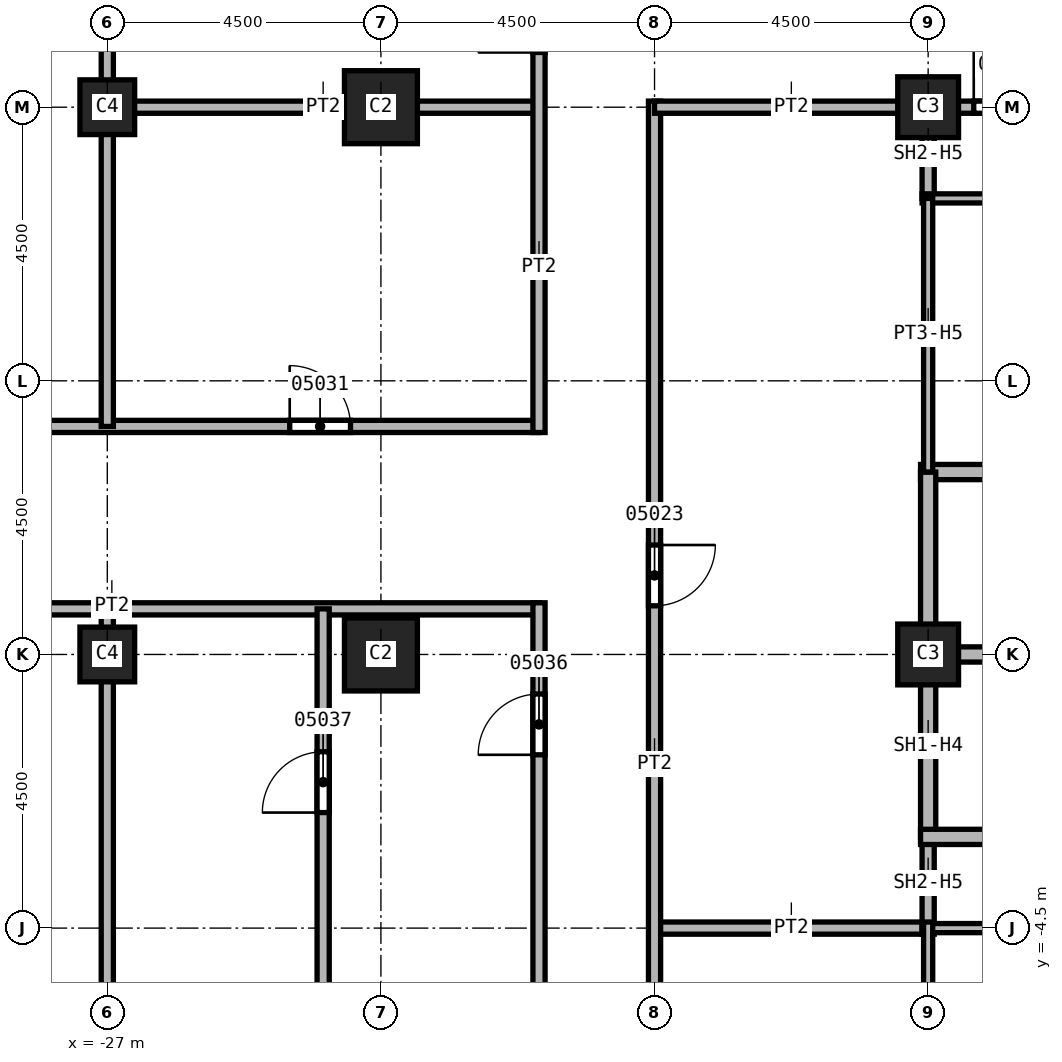
"""IFC4 building model, lengths in metres.
Left out: names, types, materials, properties, quantities, classifications, styles, units other than length and angle.
Written with IfcOpenShell. Run it as: python <this file> out.ifc"""

import sys

from ifc_helpers import new_model, si_unit, direction, frame, frame_2d, origin, origin_2d, place, context, subcontext, project, spatial, rectangle, extrude, element, fill, save


model = new_model("IFC4")
c1 = context("Model", 3, precision=1e-05, world=origin(), true_north=direction((0.0, 1.0)))
c2 = subcontext(c1, "Body", "Model", "MODEL_VIEW")
j1 = project(units=[si_unit("LENGTHUNIT", "METRE"), si_unit("PLANEANGLEUNIT", "RADIAN")], contexts=[c1])
p1 = place(None, origin())
s1 = spatial("IfcSite", under=j1, at=p1, CompositionType="ELEMENT")
p2 = place(p1, origin())
s2 = spatial("IfcBuilding", under=s1, at=p2, CompositionType="ELEMENT")
p3 = place(p2, frame((0.0, 0.0, 116.0)))
s3 = spatial("IfcBuildingStorey", under=s2, at=p3, CompositionType="ELEMENT", Elevation=116.0)
for number, where, z_axis, x_axis in (
    (1, (-22.5, 0.0, 0.0), (0.0, 0.0, 1.0), (1.0, 0.0, 0.0)),
    (2, (-22.5, 9.0, 0.0), (0.0, 0.0, 1.0), (1.0, 0.0, 0.0)),
):
    element("IfcColumn", number, at=place(p3, frame(where, z_axis=z_axis, x_axis=x_axis)), inside=s3, PredefinedType="COLUMN", context=c2, shape_type="SweptSolid", body=[
        extrude(rectangle(XDim=1.2, YDim=1.2, at=origin_2d()), origin(), (0.0, 0.0, 1.0), 3.6),
    ])
for number, where, z_axis, x_axis in (
    (3, (-13.5, 0.0, 0.0), (0.0, 0.0, 1.0), (1.0, 0.0, 0.0)),
    (4, (-13.5, 9.0, 0.0), (0.0, 0.0, 1.0), (1.0, 0.0, 0.0)),
):
    element("IfcColumn", number, at=place(p3, frame(where, z_axis=z_axis, x_axis=x_axis)), inside=s3, PredefinedType="COLUMN", context=c2, shape_type="SweptSolid", body=[
        extrude(rectangle(XDim=1.0, YDim=1.0, at=origin_2d()), origin(), (0.0, 0.0, 1.0), 3.6),
    ])
for number, where, z_axis, x_axis in (
    (5, (-27.0, 0.0, 0.0), (0.0, 0.0, 1.0), (1.0, 0.0, 0.0)),
    (6, (-27.0, 9.0, 0.0), (0.0, 0.0, 1.0), (1.0, 0.0, 0.0)),
):
    element("IfcColumn", number, at=place(p3, frame(where, z_axis=z_axis, x_axis=x_axis)), inside=s3, PredefinedType="COLUMN", context=c2, shape_type="SweptSolid", body=[
        extrude(rectangle(XDim=0.9, YDim=0.9, at=origin_2d()), origin(), (0.0, 0.0, 1.0), 3.6),
    ])
p4 = place(p3, frame((-33.85, 3.75, 0.0), z_axis=(0.0, 0.0, 1.0), x_axis=(1.0, 0.0, 0.0)))
e7 = element("IfcWall", 7, at=p4, inside=s3, PredefinedType="PARTITIONING", context=c2, shape_type="SweptSolid", body=[
    extrude(rectangle(XDim=13.95, YDim=0.2, at=frame_2d((6.975, 0.0))), origin(), (0.0, 0.0, 1.0), 3.6),
])
p5 = place(p4, frame((9.85, 0.0, 0.0)))
e8 = element("IfcOpeningElement", 8, at=p5, cuts=e7, PredefinedType="OPENING", context=c2, shape_type="SweptSolid", body=[
    extrude(rectangle(XDim=1.0, YDim=2.1, at=frame_2d((0.5, 1.05))), frame((0.0, 0.1, 0.0), z_axis=(0.0, -1.0, 0.0), x_axis=(1.0, 0.0, 0.0)), (0.0, 0.0, 1.0), 0.2),
])
p6 = place(p3, frame((-27.1, 9.0, 0.0), z_axis=(0.0, 0.0, 1.0), x_axis=(1.0, 0.0, 0.0)))
e9 = element("IfcWall", 9, at=p6, inside=s3, PredefinedType="PARTITIONING", context=c2, shape_type="SweptSolid", body=[
    extrude(rectangle(XDim=7.2, YDim=0.2, at=frame_2d((3.6, 0.0))), origin(), (0.0, 0.0, 1.0), 3.6),
])
p7 = place(p3, frame((-27.0, -17.4, 0.0), z_axis=(0.0, 0.0, 1.0), x_axis=(0.0, 1.0, 0.0)))
e10 = element("IfcWall", 10, at=p7, inside=s3, PredefinedType="PARTITIONING", context=c2, shape_type="SweptSolid", body=[
    extrude(rectangle(XDim=18.15, YDim=0.2, at=frame_2d((9.075, 0.0))), origin(), (0.0, 0.0, 1.0), 3.6),
])
p8 = place(p3, frame((-27.0, 3.75, 0.0), z_axis=(0.0, 0.0, 1.0), x_axis=(0.0, 1.0, 0.0)))
e11 = element("IfcWall", 11, at=p8, inside=s3, PredefinedType="PARTITIONING", context=c2, shape_type="SweptSolid", body=[
    extrude(rectangle(XDim=13.65, YDim=0.2, at=frame_2d((6.825, 0.0))), origin(), (0.0, 0.0, 1.0), 3.6),
])
p9 = place(p3, frame((-19.9, 0.75, 0.0), z_axis=(0.0, 0.0, 1.0), x_axis=(-1.0, 0.0, 0.0)))
e12 = element("IfcWall", 12, at=p9, inside=s3, PredefinedType="PARTITIONING", context=c2, shape_type="SweptSolid", body=[
    extrude(rectangle(XDim=13.95, YDim=0.2, at=frame_2d((6.975, 0.0))), origin(), (0.0, 0.0, 1.0), 3.6),
])
p10 = place(p3, frame((-23.45, -15.75, 0.0), z_axis=(0.0, 0.0, 1.0), x_axis=(0.0, 1.0, 0.0)))
e13 = element("IfcWall", 13, at=p10, inside=s3, PredefinedType="PARTITIONING", context=c2, shape_type="SweptSolid", body=[
    extrude(rectangle(XDim=16.5, YDim=0.2, at=frame_2d((8.25, 0.0))), origin(), (0.0, 0.0, 1.0), 3.6),
])
p11 = place(p10, frame((7.6, 0.0, 0.0)))
e14 = element("IfcOpeningElement", 14, at=p11, cuts=e13, PredefinedType="OPENING", context=c2, shape_type="SweptSolid", body=[
    extrude(rectangle(XDim=1.0, YDim=2.1, at=frame_2d((0.5, 1.05))), frame((0.0, 0.1, 0.0), z_axis=(0.0, -1.0, 0.0), x_axis=(1.0, 0.0, 0.0)), (0.0, 0.0, 1.0), 0.2),
])
p12 = place(p10, frame((13.15, 0.0, 0.0)))
e15 = element("IfcOpeningElement", 15, at=p12, cuts=e13, PredefinedType="OPENING", context=c2, shape_type="SweptSolid", body=[
    extrude(rectangle(XDim=1.0, YDim=2.1, at=frame_2d((0.5, 1.05))), frame((0.0, 0.1, 0.0), z_axis=(0.0, -1.0, 0.0), x_axis=(1.0, 0.0, 0.0)), (0.0, 0.0, 1.0), 0.2),
])
p13 = place(p3, frame((-19.9, -24.5, 0.0), z_axis=(0.0, 0.0, 1.0), x_axis=(0.0, 1.0, 0.0)))
e16 = element("IfcWall", 16, at=p13, inside=s3, PredefinedType="PARTITIONING", context=c2, shape_type="SweptSolid", body=[
    extrude(rectangle(XDim=25.35, YDim=0.2, at=frame_2d((12.675, 0.0))), origin(), (0.0, 0.0, 1.0), 3.6),
])
p14 = place(p13, frame((2.05, 0.0, 0.0)))
e17 = element("IfcOpeningElement", 17, at=p14, cuts=e16, PredefinedType="OPENING", context=c2, shape_type="SweptSolid", body=[
    extrude(rectangle(XDim=1.0, YDim=2.1, at=frame_2d((0.5, 1.05))), frame((0.0, 0.1, 0.0), z_axis=(0.0, -1.0, 0.0), x_axis=(1.0, 0.0, 0.0)), (0.0, 0.0, 1.0), 0.2),
])
p15 = place(p13, frame((10.1, 0.0, 0.0)))
e18 = element("IfcOpeningElement", 18, at=p15, cuts=e16, PredefinedType="OPENING", context=c2, shape_type="SweptSolid", body=[
    extrude(rectangle(XDim=1.0, YDim=2.1, at=frame_2d((0.5, 1.05))), frame((0.0, 0.1, 0.0), z_axis=(0.0, -1.0, 0.0), x_axis=(1.0, 0.0, 0.0)), (0.0, 0.0, 1.0), 0.2),
])
p16 = place(p13, frame((22.85, 0.0, 0.0)))
e19 = element("IfcOpeningElement", 19, at=p16, cuts=e16, PredefinedType="OPENING", context=c2, shape_type="SweptSolid", body=[
    extrude(rectangle(XDim=1.0, YDim=2.1, at=frame_2d((0.5, 1.05))), frame((0.0, 0.1, 0.0), z_axis=(0.0, -1.0, 0.0), x_axis=(1.0, 0.0, 0.0)), (0.0, 0.0, 1.0), 0.2),
])
p17 = place(p3, frame((-19.9, 3.65, 0.0), z_axis=(0.0, 0.0, 1.0), x_axis=(0.0, 1.0, 0.0)))
e20 = element("IfcWall", 20, at=p17, inside=s3, PredefinedType="PARTITIONING", context=c2, shape_type="SweptSolid", body=[
    extrude(rectangle(XDim=9.95, YDim=0.2, at=frame_2d((4.975, 0.0))), origin(), (0.0, 0.0, 1.0), 3.6),
])
p18 = place(p17, frame((6.25, 0.0, 0.0)))
e21 = element("IfcOpeningElement", 21, at=p18, cuts=e20, PredefinedType="OPENING", context=c2, shape_type="SweptSolid", body=[
    extrude(rectangle(XDim=1.0, YDim=2.1, at=frame_2d((0.5, 1.05))), frame((0.0, 0.1, 0.0), z_axis=(0.0, -1.0, 0.0), x_axis=(1.0, 0.0, 0.0)), (0.0, 0.0, 1.0), 0.2),
])
p19 = place(p3, frame((-18.0, -4.5, 0.0), z_axis=(0.0, 0.0, 1.0), x_axis=(1.0, 0.0, 0.0)))
e22 = element("IfcWall", 22, at=p19, inside=s3, PredefinedType="PARTITIONING", context=c2, shape_type="SweptSolid", body=[
    extrude(rectangle(XDim=4.5, YDim=0.2, at=frame_2d((2.25, 0.0))), origin(), (0.0, 0.0, 1.0), 3.6),
])
p20 = place(p3, frame((-18.0, 9.1, 0.0), z_axis=(0.0, 0.0, 1.0), x_axis=(0.0, -1.0, 0.0)))
e23 = element("IfcWall", 23, at=p20, inside=s3, PredefinedType="PARTITIONING", context=c2, shape_type="SweptSolid", body=[
    extrude(rectangle(XDim=18.2, YDim=0.2, at=frame_2d((9.1, 0.0))), origin(), (0.0, 0.0, 1.0), 3.6),
])
p21 = place(p20, frame((16.9, 0.0, 0.0)))
e24 = element("IfcOpeningElement", 24, at=p21, cuts=e23, PredefinedType="OPENING", context=c2, shape_type="SweptSolid", body=[
    extrude(rectangle(XDim=1.0, YDim=2.1, at=frame_2d((0.5, 1.05))), frame((0.0, 0.1, 0.0), z_axis=(0.0, -1.0, 0.0), x_axis=(1.0, 0.0, 0.0)), (0.0, 0.0, 1.0), 0.2),
])
p22 = place(p20, frame((7.3, 0.0, 0.0)))
e25 = element("IfcOpeningElement", 25, at=p22, cuts=e23, PredefinedType="OPENING", context=c2, shape_type="SweptSolid", body=[
    extrude(rectangle(XDim=1.0, YDim=2.1, at=frame_2d((0.5, 1.05))), frame((0.0, 0.1, 0.0), z_axis=(0.0, -1.0, 0.0), x_axis=(1.0, 0.0, 0.0)), (0.0, 0.0, 1.0), 0.2),
])
p23 = place(p3, frame((-13.5, 9.0, 0.0), z_axis=(0.0, 0.0, 1.0), x_axis=(-1.0, 0.0, 0.0)))
e26 = element("IfcWall", 26, at=p23, inside=s3, PredefinedType="PARTITIONING", context=c2, shape_type="SweptSolid", body=[
    extrude(rectangle(XDim=4.5, YDim=0.2, at=frame_2d((2.25, 0.0))), origin(), (0.0, 0.0, 1.0), 3.6),
])
p24 = place(p3, frame((-13.6, 9.0, 0.0), z_axis=(0.0, 0.0, 1.0), x_axis=(1.0, 0.0, 0.0)))
e27 = element("IfcWall", 27, at=p24, inside=s3, PredefinedType="SOLIDWALL", context=c2, shape_type="SweptSolid", body=[
    extrude(rectangle(XDim=3.1, YDim=0.2, at=frame_2d((1.55, 0.0))), origin(), (0.0, 0.0, 1.0), 2.838),
])
p25 = place(p24, frame((0.85, 0.0, 0.0)))
e28 = element("IfcOpeningElement", 28, at=p25, cuts=e27, PredefinedType="OPENING", context=c2, shape_type="SweptSolid", body=[
    extrude(rectangle(XDim=1.1, YDim=2.1, at=frame_2d((0.55, 1.05))), frame((0.0, 0.1, 0.0), z_axis=(0.0, -1.0, 0.0), x_axis=(1.0, 0.0, 0.0)), (0.0, 0.0, 1.0), 0.2),
])
for number, where, z_axis, x_axis in (
    (29, (-13.5, -4.6, 0.0), (0.0, 0.0, 1.0), (0.0, 1.0, 0.0)),
    (30, (-13.5, 7.5, 0.0), (0.0, 0.0, 1.0), (0.0, 1.0, 0.0)),
):
    element("IfcWall", number, at=place(p3, frame(where, z_axis=z_axis, x_axis=x_axis)), inside=s3, PredefinedType="SOLIDWALL", context=c2, shape_type="SweptSolid", body=[
        extrude(rectangle(XDim=1.6, YDim=0.2, at=frame_2d((0.8, 0.0))), origin(), (0.0, 0.0, 1.0), 2.838),
    ])
p26 = place(p3, frame((-13.625, 0.0, 0.0), z_axis=(0.0, 0.0, 1.0), x_axis=(1.0, 0.0, 0.0)))
e31 = element("IfcWall", 31, at=p26, inside=s3, PredefinedType="SOLIDWALL", context=c2, shape_type="SweptSolid", body=[
    extrude(rectangle(XDim=3.125, YDim=0.25, at=frame_2d((1.562, 0.0))), origin(), (0.0, 0.0, 1.0), 3.6),
])
p27 = place(p3, frame((-13.625, 3.0, 0.0), z_axis=(0.0, 0.0, 1.0), x_axis=(1.0, 0.0, 0.0)))
e32 = element("IfcWall", 32, at=p27, inside=s3, PredefinedType="SOLIDWALL", context=c2, shape_type="SweptSolid", body=[
    extrude(rectangle(XDim=6.125, YDim=0.25, at=frame_2d((3.062, 0.0))), origin(), (0.0, 0.0, 1.0), 3.6),
])
p28 = place(p27, frame((3.25, 0.0, 0.0)))
e33 = element("IfcOpeningElement", 33, at=p28, cuts=e32, PredefinedType="OPENING", context=c2, shape_type="SweptSolid", body=[
    extrude(rectangle(XDim=1.1, YDim=2.1, at=frame_2d((0.55, 1.05))), frame((0.0, 0.125, 0.0), z_axis=(0.0, -1.0, 0.0), x_axis=(1.0, 0.0, 0.0)), (0.0, 0.0, 1.0), 0.25),
])
p29 = place(p3, frame((-13.5, -3.0, 0.0), z_axis=(0.0, 0.0, 1.0), x_axis=(0.0, 1.0, 0.0)))
e34 = element("IfcWall", 34, at=p29, inside=s3, PredefinedType="SOLIDWALL", context=c2, shape_type="SweptSolid", body=[
    extrude(rectangle(XDim=6.0, YDim=0.25, at=frame_2d((3.0, 0.0))), origin(), (0.0, 0.0, 1.0), 2.838),
])
p30 = place(p3, frame((-13.625, -3.0, 0.0), z_axis=(0.0, 0.0, 1.0), x_axis=(1.0, 0.0, 0.0)))
e35 = element("IfcWall", 35, at=p30, inside=s3, PredefinedType="SOLIDWALL", context=c2, shape_type="SweptSolid", body=[
    extrude(rectangle(XDim=9.25, YDim=0.25, at=frame_2d((4.625, 0.0))), origin(), (0.0, 0.0, 1.0), 3.6),
])
p31 = place(p30, frame((3.25, 0.0, 0.0)))
e36 = element("IfcOpeningElement", 36, at=p31, cuts=e35, PredefinedType="OPENING", context=c2, shape_type="SweptSolid", body=[
    extrude(rectangle(XDim=1.1, YDim=2.1, at=frame_2d((0.55, 1.05))), frame((0.0, 0.125, 0.0), z_axis=(0.0, -1.0, 0.0), x_axis=(1.0, 0.0, 0.0)), (0.0, 0.0, 1.0), 0.25),
])
for number, where, z_axis, x_axis in (
    (37, (-13.6, -4.5, 0.0), (0.0, 0.0, 1.0), (1.0, 0.0, 0.0)),
    (38, (-13.6, 7.5, 0.0), (0.0, 0.0, 1.0), (1.0, 0.0, 0.0)),
):
    element("IfcWall", number, at=place(p3, frame(where, z_axis=z_axis, x_axis=x_axis)), inside=s3, PredefinedType="PARTITIONING", context=c2, shape_type="SweptSolid", body=[
        extrude(rectangle(XDim=3.1, YDim=0.15, at=frame_2d((1.55, 0.0))), origin(), (0.0, 0.0, 1.0), 3.6),
    ])
p32 = place(p3, frame((-13.5, -9.1, 0.0), z_axis=(0.0, 0.0, 1.0), x_axis=(0.0, 1.0, 0.0)))
e39 = element("IfcWall", 39, at=p32, inside=s3, PredefinedType="PARTITIONING", context=c2, shape_type="SweptSolid", body=[
    extrude(rectangle(XDim=4.7, YDim=0.15, at=frame_2d((2.35, 0.0))), origin(), (0.0, 0.0, 1.0), 2.838),
])
p33 = place(p3, frame((-13.5, 3.0, 0.0), z_axis=(0.0, 0.0, 1.0), x_axis=(0.0, 1.0, 0.0)))
e40 = element("IfcWall", 40, at=p33, inside=s3, PredefinedType="PARTITIONING", context=c2, shape_type="SweptSolid", body=[
    extrude(rectangle(XDim=4.5, YDim=0.15, at=frame_2d((2.25, 0.0))), origin(), (0.0, 0.0, 1.0), 2.838),
])
p34 = place(p25, origin())
e41 = element("IfcDoor", 41, at=p34, inside=s3, OperationType="SINGLE_SWING_RIGHT", PredefinedType="DOOR", context=c2, shape_type="SweptSolid", body=[
    extrude(rectangle(XDim=1.1, YDim=2.1, at=frame_2d((0.55, 1.05))), frame((0.0, 0.025, 0.0), z_axis=(0.0, -1.0, 0.0), x_axis=(1.0, 0.0, 0.0)), (0.0, 0.0, 1.0), 0.05),
])
fill(e28, e41)
p35 = place(p22, origin())
e42 = element("IfcDoor", 42, at=p35, inside=s3, OperationType="SINGLE_SWING_RIGHT", PredefinedType="DOOR", context=c2, shape_type="SweptSolid", body=[
    extrude(rectangle(XDim=1.0, YDim=2.1, at=frame_2d((0.5, 1.05))), frame((0.0, 0.025, 0.0), z_axis=(0.0, -1.0, 0.0), x_axis=(1.0, 0.0, 0.0)), (0.0, 0.0, 1.0), 0.05),
])
fill(e25, e42)
p36 = place(p5, origin())
e43 = element("IfcDoor", 43, at=p36, inside=s3, OperationType="SINGLE_SWING_RIGHT", PredefinedType="DOOR", context=c2, shape_type="SweptSolid", body=[
    extrude(rectangle(XDim=1.0, YDim=2.1, at=frame_2d((0.5, 1.05))), frame((0.0, 0.025, 0.0), z_axis=(0.0, -1.0, 0.0), x_axis=(1.0, 0.0, 0.0)), (0.0, 0.0, 1.0), 0.05),
])
fill(e8, e43)
p37 = place(p16, origin())
e44 = element("IfcDoor", 44, at=p37, inside=s3, OperationType="SINGLE_SWING_LEFT", PredefinedType="DOOR", context=c2, shape_type="SweptSolid", body=[
    extrude(rectangle(XDim=1.0, YDim=2.1, at=frame_2d((0.5, 1.05))), frame((0.0, 0.025, 0.0), z_axis=(0.0, -1.0, 0.0), x_axis=(1.0, 0.0, 0.0)), (0.0, 0.0, 1.0), 0.05),
])
fill(e19, e44)
p38 = place(p12, origin())
e45 = element("IfcDoor", 45, at=p38, inside=s3, OperationType="SINGLE_SWING_RIGHT", PredefinedType="DOOR", context=c2, shape_type="SweptSolid", body=[
    extrude(rectangle(XDim=1.0, YDim=2.1, at=frame_2d((0.5, 1.05))), frame((0.0, 0.025, 0.0), z_axis=(0.0, -1.0, 0.0), x_axis=(1.0, 0.0, 0.0)), (0.0, 0.0, 1.0), 0.05),
])
fill(e15, e45)
save(model, sys.argv[1])
